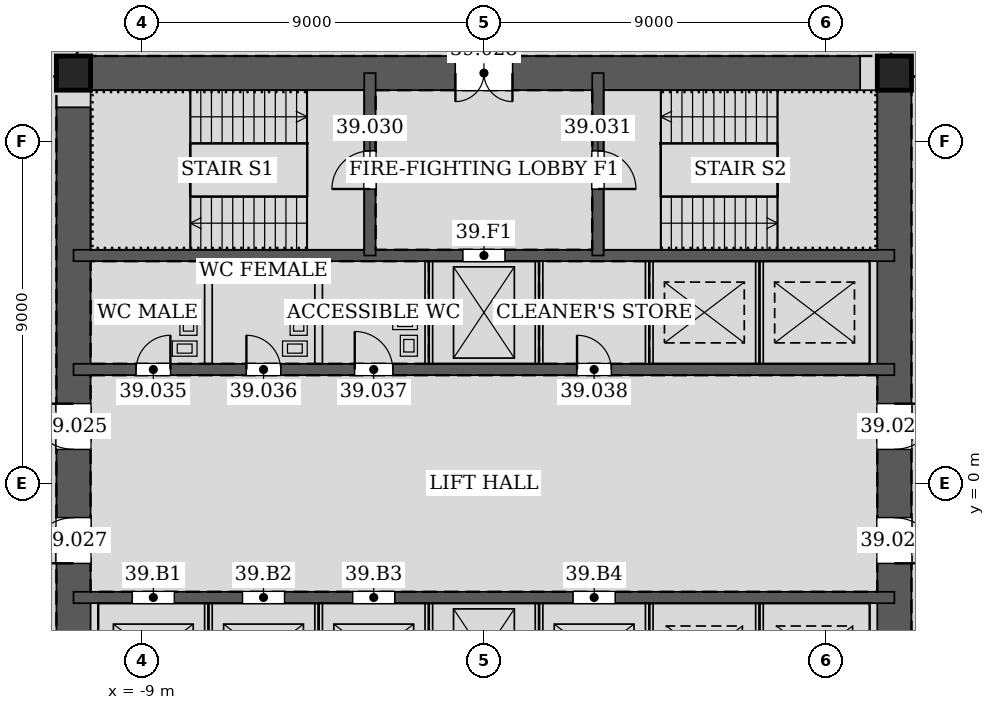
"""IFC4 building model, lengths in metres.
Left out: names, types, materials, properties, quantities, classifications, styles, units other than length and angle.
Written with IfcOpenShell. Run it as: python <this file> out.ifc"""

import sys

from ifc_helpers import new_model, si_unit, direction, frame, frame_2d, origin, origin_2d, place, context, subcontext, project, spatial, rectangle, hollow_rectangle, extrude, element, fill, save


model = new_model("IFC4")
c1 = context("Model", 3, precision=1e-05, world=origin(), true_north=direction((0.0, 1.0)))
c2 = subcontext(c1, "Body", "Model", "MODEL_VIEW")
j1 = project(units=[si_unit("LENGTHUNIT", "METRE"), si_unit("PLANEANGLEUNIT", "RADIAN")], contexts=[c1])
p1 = place(None, origin())
s1 = spatial("IfcSite", under=j1, at=p1, CompositionType="ELEMENT")
p2 = place(p1, origin())
s2 = spatial("IfcBuilding", under=s1, at=p2, CompositionType="ELEMENT")
p3 = place(p2, frame((0.0, 0.0, 172.2)))
s3 = spatial("IfcBuildingStorey", under=s2, at=p3, CompositionType="ELEMENT", Elevation=172.2)
for number, where, z_axis, x_axis in (
    (1, (10.8, 10.8, 0.0), (0.0, 0.0, 1.0), (1.0, 0.0, 0.0)),
    (2, (-10.8, 10.8, 0.0), (0.0, 0.0, 1.0), (1.0, 0.0, 0.0)),
):
    element("IfcColumn", number, at=place(p3, frame(where, z_axis=z_axis, x_axis=x_axis)), inside=s3, PredefinedType="COLUMN", context=c2, shape_type="SweptSolid", body=[
        extrude(hollow_rectangle(XDim=0.9, YDim=0.9, WallThickness=0.06, at=origin_2d()), origin(), (0.0, 0.0, 1.0), 4.2),
    ])
p4 = place(p3, frame((10.8, -10.8, 0.0), z_axis=(0.0, 0.0, 1.0), x_axis=(0.0, 1.0, 0.0)))
e3 = element("IfcWall", 3, at=p4, inside=s3, PredefinedType="SOLIDWALL", context=c2, shape_type="SweptSolid", body=[
    extrude(rectangle(XDim=21.6, YDim=0.9, at=frame_2d((10.8, 0.0))), origin(), (0.0, 0.0, 1.0), 4.2),
])
p5 = place(p4, frame((11.7, 0.0, 0.0)))
e4 = element("IfcOpeningElement", 4, at=p5, cuts=e3, PredefinedType="OPENING", context=c2, shape_type="SweptSolid", body=[
    extrude(rectangle(XDim=1.2, YDim=2.1, at=frame_2d((0.6, 1.05))), frame((0.0, 0.46, 0.0), z_axis=(0.0, -1.0, 0.0), x_axis=(1.0, 0.0, 0.0)), (0.0, 0.0, 1.0), 0.92),
])
p6 = place(p4, frame((8.7, 0.0, 0.0)))
e5 = element("IfcOpeningElement", 5, at=p6, cuts=e3, PredefinedType="OPENING", context=c2, shape_type="SweptSolid", body=[
    extrude(rectangle(XDim=1.2, YDim=2.1, at=frame_2d((0.6, 1.05))), frame((0.0, 0.46, 0.0), z_axis=(0.0, -1.0, 0.0), x_axis=(1.0, 0.0, 0.0)), (0.0, 0.0, 1.0), 0.92),
])
p7 = place(p3, frame((10.8, 10.8, 0.0), z_axis=(0.0, 0.0, 1.0), x_axis=(-1.0, 0.0, 0.0)))
e6 = element("IfcWall", 6, at=p7, inside=s3, PredefinedType="SOLIDWALL", context=c2, shape_type="SweptSolid", body=[
    extrude(rectangle(XDim=21.6, YDim=0.9, at=frame_2d((10.8, 0.0))), origin(), (0.0, 0.0, 1.0), 4.2),
])
p8 = place(p7, frame((10.05, 0.0, 0.0)))
e7 = element("IfcOpeningElement", 7, at=p8, cuts=e6, PredefinedType="OPENING", context=c2, shape_type="SweptSolid", body=[
    extrude(rectangle(XDim=1.5, YDim=2.1, at=frame_2d((0.75, 1.05))), frame((0.0, 0.46, 0.0), z_axis=(0.0, -1.0, 0.0), x_axis=(1.0, 0.0, 0.0)), (0.0, 0.0, 1.0), 0.92),
])
p9 = place(p3, frame((-10.8, 10.8, 0.0), z_axis=(0.0, 0.0, 1.0), x_axis=(0.0, -1.0, 0.0)))
e8 = element("IfcWall", 8, at=p9, inside=s3, PredefinedType="SOLIDWALL", context=c2, shape_type="SweptSolid", body=[
    extrude(rectangle(XDim=21.6, YDim=0.9, at=frame_2d((10.8, 0.0))), origin(), (0.0, 0.0, 1.0), 4.2),
])
p10 = place(p9, frame((8.7, 0.0, 0.0)))
e9 = element("IfcOpeningElement", 9, at=p10, cuts=e8, PredefinedType="OPENING", context=c2, shape_type="SweptSolid", body=[
    extrude(rectangle(XDim=1.2, YDim=2.1, at=frame_2d((0.6, 1.05))), frame((0.0, 0.46, 0.0), z_axis=(0.0, -1.0, 0.0), x_axis=(1.0, 0.0, 0.0)), (0.0, 0.0, 1.0), 0.92),
])
p11 = place(p9, frame((11.7, 0.0, 0.0)))
e10 = element("IfcOpeningElement", 10, at=p11, cuts=e8, PredefinedType="OPENING", context=c2, shape_type="SweptSolid", body=[
    extrude(rectangle(XDim=1.2, YDim=2.1, at=frame_2d((0.6, 1.05))), frame((0.0, 0.46, 0.0), z_axis=(0.0, -1.0, 0.0), x_axis=(1.0, 0.0, 0.0)), (0.0, 0.0, 1.0), 0.92),
])
p12 = place(p3, frame((-10.8, 3.0, 0.0), z_axis=(0.0, 0.0, 1.0), x_axis=(1.0, 0.0, 0.0)))
e11 = element("IfcWall", 11, at=p12, inside=s3, PredefinedType="SOLIDWALL", context=c2, shape_type="SweptSolid", body=[
    extrude(rectangle(XDim=21.6, YDim=0.3, at=frame_2d((10.8, 0.0))), origin(), (0.0, 0.0, 1.0), 4.2),
])
p13 = place(p12, frame((1.65, 0.0, 0.0)))
e12 = element("IfcOpeningElement", 12, at=p13, cuts=e11, PredefinedType="OPENING", context=c2, shape_type="SweptSolid", body=[
    extrude(rectangle(XDim=0.9, YDim=2.1, at=frame_2d((0.45, 1.05))), frame((0.0, 0.16, 0.0), z_axis=(0.0, -1.0, 0.0), x_axis=(1.0, 0.0, 0.0)), (0.0, 0.0, 1.0), 0.32),
])
p14 = place(p12, frame((4.55, 0.0, 0.0)))
e13 = element("IfcOpeningElement", 13, at=p14, cuts=e11, PredefinedType="OPENING", context=c2, shape_type="SweptSolid", body=[
    extrude(rectangle(XDim=0.9, YDim=2.1, at=frame_2d((0.45, 1.05))), frame((0.0, 0.16, 0.0), z_axis=(0.0, -1.0, 0.0), x_axis=(1.0, 0.0, 0.0)), (0.0, 0.0, 1.0), 0.32),
])
p15 = place(p12, frame((7.4, 0.0, 0.0)))
e14 = element("IfcOpeningElement", 14, at=p15, cuts=e11, PredefinedType="OPENING", context=c2, shape_type="SweptSolid", body=[
    extrude(rectangle(XDim=1.0, YDim=2.1, at=frame_2d((0.5, 1.05))), frame((0.0, 0.16, 0.0), z_axis=(0.0, -1.0, 0.0), x_axis=(1.0, 0.0, 0.0)), (0.0, 0.0, 1.0), 0.32),
])
p16 = place(p12, frame((13.25, 0.0, 0.0)))
e15 = element("IfcOpeningElement", 15, at=p16, cuts=e11, PredefinedType="OPENING", context=c2, shape_type="SweptSolid", body=[
    extrude(rectangle(XDim=0.9, YDim=2.1, at=frame_2d((0.45, 1.05))), frame((0.0, 0.16, 0.0), z_axis=(0.0, -1.0, 0.0), x_axis=(1.0, 0.0, 0.0)), (0.0, 0.0, 1.0), 0.32),
])
p17 = place(p3, frame((-10.8, 6.0, 0.0), z_axis=(0.0, 0.0, 1.0), x_axis=(1.0, 0.0, 0.0)))
e16 = element("IfcWall", 16, at=p17, inside=s3, PredefinedType="SOLIDWALL", context=c2, shape_type="SweptSolid", body=[
    extrude(rectangle(XDim=21.6, YDim=0.3, at=frame_2d((10.8, 0.0))), origin(), (0.0, 0.0, 1.0), 4.2),
])
p18 = place(p17, frame((10.25, 0.0, 0.0)))
e17 = element("IfcOpeningElement", 17, at=p18, cuts=e16, PredefinedType="OPENING", context=c2, shape_type="SweptSolid", body=[
    extrude(rectangle(XDim=1.1, YDim=2.1, at=frame_2d((0.55, 1.05))), frame((0.0, 0.16, 0.0), z_axis=(0.0, -1.0, 0.0), x_axis=(1.0, 0.0, 0.0)), (0.0, 0.0, 1.0), 0.32),
])
p19 = place(p3, frame((-3.0, 6.0, 0.0), z_axis=(0.0, 0.0, 1.0), x_axis=(0.0, 1.0, 0.0)))
e18 = element("IfcWall", 18, at=p19, inside=s3, PredefinedType="SOLIDWALL", context=c2, shape_type="SweptSolid", body=[
    extrude(rectangle(XDim=4.8, YDim=0.3, at=frame_2d((2.4, 0.0))), origin(), (0.0, 0.0, 1.0), 4.2),
])
p20 = place(p19, frame((1.75, 0.0, 0.0)))
e19 = element("IfcOpeningElement", 19, at=p20, cuts=e18, PredefinedType="OPENING", context=c2, shape_type="SweptSolid", body=[
    extrude(rectangle(XDim=1.0, YDim=2.1, at=frame_2d((0.5, 1.05))), frame((0.0, 0.16, 0.0), z_axis=(0.0, -1.0, 0.0), x_axis=(1.0, 0.0, 0.0)), (0.0, 0.0, 1.0), 0.32),
])
p21 = place(p3, frame((3.0, 6.0, 0.0), z_axis=(0.0, 0.0, 1.0), x_axis=(0.0, 1.0, 0.0)))
e20 = element("IfcWall", 20, at=p21, inside=s3, PredefinedType="SOLIDWALL", context=c2, shape_type="SweptSolid", body=[
    extrude(rectangle(XDim=4.8, YDim=0.3, at=frame_2d((2.4, 0.0))), origin(), (0.0, 0.0, 1.0), 4.2),
])
p22 = place(p21, frame((1.75, 0.0, 0.0)))
e21 = element("IfcOpeningElement", 21, at=p22, cuts=e20, PredefinedType="OPENING", context=c2, shape_type="SweptSolid", body=[
    extrude(rectangle(XDim=1.0, YDim=2.1, at=frame_2d((0.5, 1.05))), frame((0.0, 0.16, 0.0), z_axis=(0.0, -1.0, 0.0), x_axis=(1.0, 0.0, 0.0)), (0.0, 0.0, 1.0), 0.32),
])
p23 = place(p3, frame((-10.8, -3.0, 0.0), z_axis=(0.0, 0.0, 1.0), x_axis=(1.0, 0.0, 0.0)))
e22 = element("IfcWall", 22, at=p23, inside=s3, PredefinedType="SOLIDWALL", context=c2, shape_type="SweptSolid", body=[
    extrude(rectangle(XDim=21.6, YDim=0.3, at=frame_2d((10.8, 0.0))), origin(), (0.0, 0.0, 1.0), 4.2),
])
p24 = place(p23, frame((1.55, 0.0, 0.0)))
e23 = element("IfcOpeningElement", 23, at=p24, cuts=e22, PredefinedType="OPENING", context=c2, shape_type="SweptSolid", body=[
    extrude(rectangle(XDim=1.1, YDim=2.1, at=frame_2d((0.55, 1.05))), frame((0.0, 0.16, 0.0), z_axis=(0.0, -1.0, 0.0), x_axis=(1.0, 0.0, 0.0)), (0.0, 0.0, 1.0), 0.32),
])
p25 = place(p23, frame((4.45, 0.0, 0.0)))
e24 = element("IfcOpeningElement", 24, at=p25, cuts=e22, PredefinedType="OPENING", context=c2, shape_type="SweptSolid", body=[
    extrude(rectangle(XDim=1.1, YDim=2.1, at=frame_2d((0.55, 1.05))), frame((0.0, 0.16, 0.0), z_axis=(0.0, -1.0, 0.0), x_axis=(1.0, 0.0, 0.0)), (0.0, 0.0, 1.0), 0.32),
])
p26 = place(p23, frame((7.35, 0.0, 0.0)))
e25 = element("IfcOpeningElement", 25, at=p26, cuts=e22, PredefinedType="OPENING", context=c2, shape_type="SweptSolid", body=[
    extrude(rectangle(XDim=1.1, YDim=2.1, at=frame_2d((0.55, 1.05))), frame((0.0, 0.16, 0.0), z_axis=(0.0, -1.0, 0.0), x_axis=(1.0, 0.0, 0.0)), (0.0, 0.0, 1.0), 0.32),
])
p27 = place(p23, frame((13.15, 0.0, 0.0)))
e26 = element("IfcOpeningElement", 26, at=p27, cuts=e22, PredefinedType="OPENING", context=c2, shape_type="SweptSolid", body=[
    extrude(rectangle(XDim=1.1, YDim=2.1, at=frame_2d((0.55, 1.05))), frame((0.0, 0.16, 0.0), z_axis=(0.0, -1.0, 0.0), x_axis=(1.0, 0.0, 0.0)), (0.0, 0.0, 1.0), 0.32),
])
for number, where, z_axis, x_axis in (
    (27, (-7.25, 3.15, 0.0), (0.0, 0.0, 1.0), (0.0, 1.0, 0.0)),
    (28, (-4.35, 3.15, 0.0), (0.0, 0.0, 1.0), (0.0, 1.0, 0.0)),
    (29, (-1.45, 3.15, 0.0), (0.0, 0.0, 1.0), (0.0, 1.0, 0.0)),
    (30, (1.45, 3.15, 0.0), (0.0, 0.0, 1.0), (0.0, 1.0, 0.0)),
    (31, (4.35, 3.15, 0.0), (0.0, 0.0, 1.0), (0.0, 1.0, 0.0)),
):
    element("IfcWall", number, at=place(p3, frame(where, z_axis=z_axis, x_axis=x_axis)), inside=s3, PredefinedType="PARTITIONING", context=c2, shape_type="SweptSolid", body=[
        extrude(rectangle(XDim=2.7, YDim=0.2, at=frame_2d((1.35, 0.0))), origin(), (0.0, 0.0, 1.0), 4.035),
    ])
for number, where, z_axis, x_axis in (
    (32, (7.25, 3.15, 0.0), (0.0, 0.0, 1.0), (0.0, 1.0, 0.0)),
    (33, (-7.25, -5.85, 0.0), (0.0, 0.0, 1.0), (0.0, 1.0, 0.0)),
    (34, (-4.35, -5.85, 0.0), (0.0, 0.0, 1.0), (0.0, 1.0, 0.0)),
    (35, (-1.45, -5.85, 0.0), (0.0, 0.0, 1.0), (0.0, 1.0, 0.0)),
    (36, (1.45, -5.85, 0.0), (0.0, 0.0, 1.0), (0.0, 1.0, 0.0)),
    (37, (4.35, -5.85, 0.0), (0.0, 0.0, 1.0), (0.0, 1.0, 0.0)),
    (38, (7.25, -5.85, 0.0), (0.0, 0.0, 1.0), (0.0, 1.0, 0.0)),
):
    element("IfcWall", number, at=place(p3, frame(where, z_axis=z_axis, x_axis=x_axis)), inside=s3, PredefinedType="PARTITIONING", context=c2, shape_type="SweptSolid", body=[
        extrude(rectangle(XDim=2.7, YDim=0.2, at=frame_2d((1.35, 0.0))), origin(), (0.0, 0.0, 1.0), 4.2),
    ])
p28 = place(p5, frame((1.2, 0.0, 0.0), z_axis=(0.0, 0.0, 1.0), x_axis=(-1.0, 0.0, 0.0)))
e39 = element("IfcDoor", 39, at=p28, inside=s3, OperationType="SINGLE_SWING_LEFT", PredefinedType="DOOR", context=c2, shape_type="SweptSolid", body=[
    extrude(rectangle(XDim=1.2, YDim=2.1, at=frame_2d((0.6, 1.05))), frame((0.0, 0.025, 0.0), z_axis=(0.0, -1.0, 0.0), x_axis=(1.0, 0.0, 0.0)), (0.0, 0.0, 1.0), 0.05),
])
fill(e4, e39)
p29 = place(p10, frame((1.2, 0.0, 0.0), z_axis=(0.0, 0.0, 1.0), x_axis=(-1.0, 0.0, 0.0)))
e40 = element("IfcDoor", 40, at=p29, inside=s3, OperationType="SINGLE_SWING_RIGHT", PredefinedType="DOOR", context=c2, shape_type="SweptSolid", body=[
    extrude(rectangle(XDim=1.2, YDim=2.1, at=frame_2d((0.6, 1.05))), frame((0.0, 0.025, 0.0), z_axis=(0.0, -1.0, 0.0), x_axis=(1.0, 0.0, 0.0)), (0.0, 0.0, 1.0), 0.05),
])
fill(e9, e40)
p30 = place(p6, frame((1.2, 0.0, 0.0), z_axis=(0.0, 0.0, 1.0), x_axis=(-1.0, 0.0, 0.0)))
e41 = element("IfcDoor", 41, at=p30, inside=s3, OperationType="SINGLE_SWING_RIGHT", PredefinedType="DOOR", context=c2, shape_type="SweptSolid", body=[
    extrude(rectangle(XDim=1.2, YDim=2.1, at=frame_2d((0.6, 1.05))), frame((0.0, 0.025, 0.0), z_axis=(0.0, -1.0, 0.0), x_axis=(1.0, 0.0, 0.0)), (0.0, 0.0, 1.0), 0.05),
])
fill(e5, e41)
p31 = place(p11, frame((1.2, 0.0, 0.0), z_axis=(0.0, 0.0, 1.0), x_axis=(-1.0, 0.0, 0.0)))
e42 = element("IfcDoor", 42, at=p31, inside=s3, OperationType="SINGLE_SWING_LEFT", PredefinedType="DOOR", context=c2, shape_type="SweptSolid", body=[
    extrude(rectangle(XDim=1.2, YDim=2.1, at=frame_2d((0.6, 1.05))), frame((0.0, 0.025, 0.0), z_axis=(0.0, -1.0, 0.0), x_axis=(1.0, 0.0, 0.0)), (0.0, 0.0, 1.0), 0.05),
])
fill(e10, e42)
p32 = place(p8, origin())
e43 = element("IfcDoor", 43, at=p32, inside=s3, OperationType="DOUBLE_DOOR_SINGLE_SWING", PredefinedType="DOOR", context=c2, shape_type="SweptSolid", body=[
    extrude(rectangle(XDim=1.5, YDim=2.1, at=frame_2d((0.75, 1.05))), frame((0.0, 0.025, 0.0), z_axis=(0.0, -1.0, 0.0), x_axis=(1.0, 0.0, 0.0)), (0.0, 0.0, 1.0), 0.05),
])
fill(e7, e43)
p33 = place(p20, origin())
e44 = element("IfcDoor", 44, at=p33, inside=s3, OperationType="SINGLE_SWING_LEFT", PredefinedType="DOOR", context=c2, shape_type="SweptSolid", body=[
    extrude(rectangle(XDim=1.0, YDim=2.1, at=frame_2d((0.5, 1.05))), frame((0.0, 0.025, 0.0), z_axis=(0.0, -1.0, 0.0), x_axis=(1.0, 0.0, 0.0)), (0.0, 0.0, 1.0), 0.05),
])
fill(e19, e44)
p34 = place(p22, frame((1.0, 0.0, 0.0), z_axis=(0.0, 0.0, 1.0), x_axis=(-1.0, 0.0, 0.0)))
e45 = element("IfcDoor", 45, at=p34, inside=s3, OperationType="SINGLE_SWING_RIGHT", PredefinedType="DOOR", context=c2, shape_type="SweptSolid", body=[
    extrude(rectangle(XDim=1.0, YDim=2.1, at=frame_2d((0.5, 1.05))), frame((0.0, 0.025, 0.0), z_axis=(0.0, -1.0, 0.0), x_axis=(1.0, 0.0, 0.0)), (0.0, 0.0, 1.0), 0.05),
])
fill(e21, e45)
p35 = place(p13, origin())
e46 = element("IfcDoor", 46, at=p35, inside=s3, OperationType="SINGLE_SWING_RIGHT", PredefinedType="DOOR", context=c2, shape_type="SweptSolid", body=[
    extrude(rectangle(XDim=0.9, YDim=2.1, at=frame_2d((0.45, 1.05))), frame((0.0, 0.025, 0.0), z_axis=(0.0, -1.0, 0.0), x_axis=(1.0, 0.0, 0.0)), (0.0, 0.0, 1.0), 0.05),
])
fill(e12, e46)
p36 = place(p14, origin())
e47 = element("IfcDoor", 47, at=p36, inside=s3, OperationType="SINGLE_SWING_LEFT", PredefinedType="DOOR", context=c2, shape_type="SweptSolid", body=[
    extrude(rectangle(XDim=0.9, YDim=2.1, at=frame_2d((0.45, 1.05))), frame((0.0, 0.025, 0.0), z_axis=(0.0, -1.0, 0.0), x_axis=(1.0, 0.0, 0.0)), (0.0, 0.0, 1.0), 0.05),
])
fill(e13, e47)
p37 = place(p15, origin())
e48 = element("IfcDoor", 48, at=p37, inside=s3, OperationType="SINGLE_SWING_LEFT", PredefinedType="DOOR", context=c2, shape_type="SweptSolid", body=[
    extrude(rectangle(XDim=1.0, YDim=2.1, at=frame_2d((0.5, 1.05))), frame((0.0, 0.025, 0.0), z_axis=(0.0, -1.0, 0.0), x_axis=(1.0, 0.0, 0.0)), (0.0, 0.0, 1.0), 0.05),
])
fill(e14, e48)
p38 = place(p16, origin())
e49 = element("IfcDoor", 49, at=p38, inside=s3, OperationType="SINGLE_SWING_LEFT", PredefinedType="DOOR", context=c2, shape_type="SweptSolid", body=[
    extrude(rectangle(XDim=0.9, YDim=2.1, at=frame_2d((0.45, 1.05))), frame((0.0, 0.025, 0.0), z_axis=(0.0, -1.0, 0.0), x_axis=(1.0, 0.0, 0.0)), (0.0, 0.0, 1.0), 0.05),
])
fill(e15, e49)
p39 = place(p18, origin())
e50 = element("IfcDoor", 50, at=p39, inside=s3, OperationType="DOUBLE_DOOR_SLIDING", PredefinedType="DOOR", context=c2, shape_type="SweptSolid", body=[
    extrude(rectangle(XDim=1.1, YDim=2.1, at=frame_2d((0.55, 1.05))), frame((0.0, 0.025, 0.0), z_axis=(0.0, -1.0, 0.0), x_axis=(1.0, 0.0, 0.0)), (0.0, 0.0, 1.0), 0.05),
])
fill(e17, e50)
p40 = place(p24, origin())
e51 = element("IfcDoor", 51, at=p40, inside=s3, OperationType="DOUBLE_DOOR_SLIDING", PredefinedType="DOOR", context=c2, shape_type="SweptSolid", body=[
    extrude(rectangle(XDim=1.1, YDim=2.1, at=frame_2d((0.55, 1.05))), frame((0.0, 0.025, 0.0), z_axis=(0.0, -1.0, 0.0), x_axis=(1.0, 0.0, 0.0)), (0.0, 0.0, 1.0), 0.05),
])
fill(e23, e51)
p41 = place(p25, origin())
e52 = element("IfcDoor", 52, at=p41, inside=s3, OperationType="DOUBLE_DOOR_SLIDING", PredefinedType="DOOR", context=c2, shape_type="SweptSolid", body=[
    extrude(rectangle(XDim=1.1, YDim=2.1, at=frame_2d((0.55, 1.05))), frame((0.0, 0.025, 0.0), z_axis=(0.0, -1.0, 0.0), x_axis=(1.0, 0.0, 0.0)), (0.0, 0.0, 1.0), 0.05),
])
fill(e24, e52)
p42 = place(p26, origin())
e53 = element("IfcDoor", 53, at=p42, inside=s3, OperationType="DOUBLE_DOOR_SLIDING", PredefinedType="DOOR", context=c2, shape_type="SweptSolid", body=[
    extrude(rectangle(XDim=1.1, YDim=2.1, at=frame_2d((0.55, 1.05))), frame((0.0, 0.025, 0.0), z_axis=(0.0, -1.0, 0.0), x_axis=(1.0, 0.0, 0.0)), (0.0, 0.0, 1.0), 0.05),
])
fill(e25, e53)
p43 = place(p27, origin())
e54 = element("IfcDoor", 54, at=p43, inside=s3, OperationType="DOUBLE_DOOR_SLIDING", PredefinedType="DOOR", context=c2, shape_type="SweptSolid", body=[
    extrude(rectangle(XDim=1.1, YDim=2.1, at=frame_2d((0.55, 1.05))), frame((0.0, 0.025, 0.0), z_axis=(0.0, -1.0, 0.0), x_axis=(1.0, 0.0, 0.0)), (0.0, 0.0, 1.0), 0.05),
])
fill(e26, e54)
save(model, sys.argv[1])
